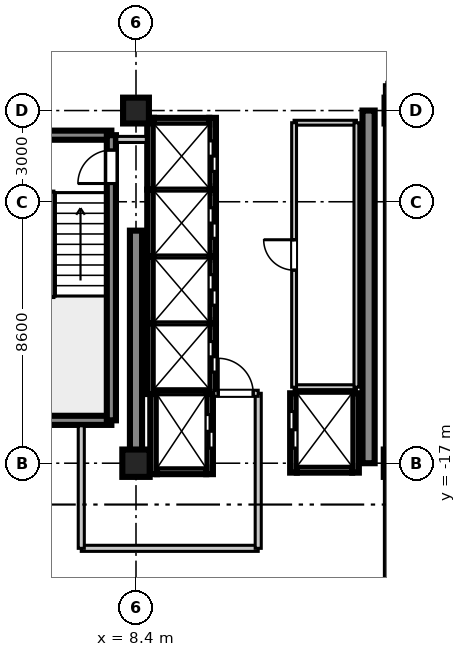
"""IFC4 building model, lengths in metres.
Left out: names, types, materials, properties, quantities, classifications, styles, units other than length and angle.
Written with IfcOpenShell. Run it as: python <this file> out.ifc"""

import sys

from ifc_helpers import new_model, si_unit, direction, frame, frame_2d, origin, origin_2d, place, context, subcontext, project, spatial, rectangle, extrude, source, transform, mapped, element, fill, save


model = new_model("IFC4")
c1 = context("Model", 3, precision=1e-05, world=origin(), true_north=direction((0.0, 1.0)))
c2 = subcontext(c1, "Body", "Model", "MODEL_VIEW")
j1 = project(units=[si_unit("LENGTHUNIT", "METRE"), si_unit("PLANEANGLEUNIT", "RADIAN")], contexts=[c1])
p1 = place(None, origin())
s1 = spatial("IfcSite", under=j1, at=p1, CompositionType="ELEMENT")
p2 = place(p1, origin())
s2 = spatial("IfcBuilding", under=s1, at=p2, CompositionType="ELEMENT")
p3 = place(p2, frame((0.0, 0.0, 319.55)))
s3 = spatial("IfcBuildingStorey", under=s2, at=p3, CompositionType="ELEMENT", Elevation=319.55)
m1 = source(origin(), c2, "Body", "SweptSolid", [
    extrude(rectangle(XDim=0.9, YDim=0.9, at=origin_2d()), origin(), (0.0, 0.0, 1.0), 3.755),
])
p4 = place(p3, frame((8.4, -17.0, 0.0), z_axis=(0.0, 0.0, 1.0), x_axis=(1.0, 0.0, 0.0)))
e1 = element("IfcColumn", 1, at=p4, inside=s3, PredefinedType="COLUMN", context=c2, shape_type="MappedRepresentation", body=[
    mapped(m1, transform((0.0, 0.0, 0.0), scale=1.0)),
])
m2 = source(origin(), c2, "Body", "SweptSolid", [
    extrude(rectangle(XDim=0.85, YDim=0.85, at=origin_2d()), origin(), (0.0, 0.0, 1.0), 3.755),
])
p5 = place(p3, frame((8.4, -5.4, 0.0), z_axis=(0.0, 0.0, 1.0), x_axis=(1.0, 0.0, 0.0)))
e2 = element("IfcColumn", 2, at=p5, inside=s3, PredefinedType="PILASTER", context=c2, shape_type="MappedRepresentation", body=[
    mapped(m2, transform((0.0, 0.0, 0.0), scale=1.0)),
])
p6 = place(p3, frame((17.0, -17.0, 0.0), z_axis=(0.0, 0.0, 1.0), x_axis=(1.0, 0.0, 0.0)))
e3 = element("IfcColumn", 3, at=p6, inside=s3, PredefinedType="COLUMN", context=c2, shape_type="MappedRepresentation", body=[
    mapped(m1, transform((0.0, 0.0, 0.0), scale=1.0)),
])
p7 = place(p3, frame((17.0, -5.4, 0.0), z_axis=(0.0, 0.0, 1.0), x_axis=(1.0, 0.0, 0.0)))
e4 = element("IfcColumn", 4, at=p7, inside=s3, PredefinedType="PILASTER", context=c2, shape_type="MappedRepresentation", body=[
    mapped(m2, transform((0.0, 0.0, 0.0), scale=1.0)),
])
m3 = source(origin(), c2, "Body", "SweptSolid", [
    extrude(rectangle(XDim=7.65, YDim=0.4, at=frame_2d((3.825, 0.0))), origin(), (0.0, 0.0, 1.0), 3.5),
])
p8 = place(p3, frame((8.4, -17.0, 0.0), z_axis=(0.0, 0.0, 1.0), x_axis=(0.0, 1.0, 0.0)))
e5 = element("IfcWall", 5, at=p8, inside=s3, PredefinedType="SHEAR", context=c2, shape_type="MappedRepresentation", body=[
    mapped(m3, transform((0.0, 0.0, 0.0), scale=1.0)),
])
m4 = source(origin(), c2, "Body", "SweptSolid", [
    extrude(rectangle(XDim=11.6, YDim=0.4, at=frame_2d((5.8, 0.0))), origin(), (0.0, 0.0, 1.0), 3.5),
])
p9 = place(p3, frame((16.05, -17.0, 0.0), z_axis=(0.0, 0.0, 1.0), x_axis=(0.0, 1.0, 0.0)))
e6 = element("IfcWall", 6, at=p9, inside=s3, PredefinedType="SHEAR", context=c2, shape_type="MappedRepresentation", body=[
    mapped(m4, transform((0.0, 0.0, 0.0), scale=1.0)),
])
m5 = source(origin(), c2, "Body", "SweptSolid", [
    extrude(rectangle(XDim=3.98, YDim=0.3, at=frame_2d((1.99, 0.0))), origin(), (0.0, 0.0, 1.0), 3.5),
])
for number, where, z_axis, x_axis in (
    (7, (3.61, -15.59, 0.0), (0.0, 0.0, 1.0), (1.0, 0.0, 0.0)),
    (8, (3.61, -6.21, 0.0), (0.0, 0.0, 1.0), (1.0, 0.0, 0.0)),
):
    element("IfcWall", number, at=place(p3, frame(where, z_axis=z_axis, x_axis=x_axis)), inside=s3, PredefinedType="SHEAR", context=c2, shape_type="MappedRepresentation", body=[
        mapped(m5, transform((0.0, 0.0, 0.0), scale=1.0)),
    ])
m6 = source(origin(), c2, "Body", "SweptSolid", [
    extrude(rectangle(XDim=9.38, YDim=0.3, at=frame_2d((4.69, 0.0))), origin(), (0.0, 0.0, 1.0), 3.5),
])
p10 = place(p3, frame((7.59, -15.59, 0.0), z_axis=(0.0, 0.0, 1.0), x_axis=(0.0, 1.0, 0.0)))
e9 = element("IfcWall", 9, at=p10, inside=s3, PredefinedType="SHEAR", context=c2, shape_type="MappedRepresentation", body=[
    mapped(m6, transform((0.0, 0.0, 0.0), scale=1.0)),
])
p11 = place(p10, frame((7.79, 0.0, 0.0)))
e10 = element("IfcOpeningElement", 10, at=p11, cuts=e9, PredefinedType="OPENING", context=c2, shape_type="SweptSolid", body=[
    extrude(rectangle(XDim=1.1, YDim=2.15, at=frame_2d((0.55, 1.075))), frame((0.0, 0.16, 0.0), z_axis=(0.0, -1.0, 0.0), x_axis=(1.0, 0.0, 0.0)), (0.0, 0.0, 1.0), 0.32),
])
m7 = source(origin(), c2, "Body", "SweptSolid", [
    extrude(rectangle(XDim=2.36, YDim=0.22, at=frame_2d((1.18, 0.0))), origin(), (0.0, 0.0, 1.0), 3.5),
])
p12 = place(p3, frame((8.88, -8.0, 0.0), z_axis=(0.0, 0.0, 1.0), x_axis=(0.0, 1.0, 0.0)))
e11 = element("IfcWall", 11, at=p12, inside=s3, PredefinedType="SHEAR", context=c2, shape_type="MappedRepresentation", body=[
    mapped(m7, transform((0.0, 0.0, 0.0), scale=1.0)),
])
p13 = place(p3, frame((10.92, -8.0, 0.0), z_axis=(0.0, 0.0, 1.0), x_axis=(0.0, 1.0, 0.0)))
e12 = element("IfcWall", 12, at=p13, inside=s3, PredefinedType="SHEAR", context=c2, shape_type="MappedRepresentation", body=[
    mapped(m7, transform((0.0, 0.0, 0.0), scale=1.0)),
])
p14 = place(p13, frame((0.6, 0.0, 0.0)))
e13 = element("IfcOpeningElement", 13, at=p14, cuts=e12, PredefinedType="OPENING", context=c2, shape_type="SweptSolid", body=[
    extrude(rectangle(XDim=1.0, YDim=2.2, at=frame_2d((0.5, 1.1))), frame((0.0, 0.12, 0.0), z_axis=(0.0, -1.0, 0.0), x_axis=(1.0, 0.0, 0.0)), (0.0, 0.0, 1.0), 0.24),
])
m8 = source(origin(), c2, "Body", "SweptSolid", [
    extrude(rectangle(XDim=1.82, YDim=0.22, at=frame_2d((0.91, 0.0))), origin(), (0.0, 0.0, 1.0), 3.5),
])
p15 = place(p3, frame((8.99, -5.75, 0.0), z_axis=(0.0, 0.0, 1.0), x_axis=(1.0, 0.0, 0.0)))
e14 = element("IfcWall", 14, at=p15, inside=s3, PredefinedType="SHEAR", context=c2, shape_type="MappedRepresentation", body=[
    mapped(m8, transform((0.0, 0.0, 0.0), scale=1.0)),
])
m9 = source(origin(), c2, "Body", "SweptSolid", [
    extrude(rectangle(XDim=2.2, YDim=0.22, at=frame_2d((1.1, 0.0))), origin(), (0.0, 0.0, 1.0), 3.5),
])
p16 = place(p3, frame((8.88, -10.2, 0.0), z_axis=(0.0, 0.0, 1.0), x_axis=(0.0, 1.0, 0.0)))
e15 = element("IfcWall", 15, at=p16, inside=s3, PredefinedType="SHEAR", context=c2, shape_type="MappedRepresentation", body=[
    mapped(m9, transform((0.0, 0.0, 0.0), scale=1.0)),
])
p17 = place(p3, frame((10.92, -10.2, 0.0), z_axis=(0.0, 0.0, 1.0), x_axis=(0.0, 1.0, 0.0)))
e16 = element("IfcWall", 16, at=p17, inside=s3, PredefinedType="SHEAR", context=c2, shape_type="MappedRepresentation", body=[
    mapped(m9, transform((0.0, 0.0, 0.0), scale=1.0)),
])
p18 = place(p17, frame((0.6, 0.0, 0.0)))
e17 = element("IfcOpeningElement", 17, at=p18, cuts=e16, PredefinedType="OPENING", context=c2, shape_type="SweptSolid", body=[
    extrude(rectangle(XDim=1.0, YDim=2.2, at=frame_2d((0.5, 1.1))), frame((0.0, 0.12, 0.0), z_axis=(0.0, -1.0, 0.0), x_axis=(1.0, 0.0, 0.0)), (0.0, 0.0, 1.0), 0.24),
])
m10 = source(origin(), c2, "Body", "SweptSolid", [
    extrude(rectangle(XDim=1.82, YDim=0.22, at=frame_2d((0.91, 0.0))), origin(), (0.0, 0.0, 1.0), 3.8),
])
p19 = place(p3, frame((8.99, -8.0, 0.0), z_axis=(0.0, 0.0, 1.0), x_axis=(1.0, 0.0, 0.0)))
e18 = element("IfcWall", 18, at=p19, inside=s3, PredefinedType="SHEAR", context=c2, shape_type="MappedRepresentation", body=[
    mapped(m10, transform((0.0, 0.0, 0.0), scale=1.0)),
])
p20 = place(p3, frame((8.88, -12.4, 0.0), z_axis=(0.0, 0.0, 1.0), x_axis=(0.0, 1.0, 0.0)))
e19 = element("IfcWall", 19, at=p20, inside=s3, PredefinedType="SHEAR", context=c2, shape_type="MappedRepresentation", body=[
    mapped(m9, transform((0.0, 0.0, 0.0), scale=1.0)),
])
p21 = place(p3, frame((10.92, -12.4, 0.0), z_axis=(0.0, 0.0, 1.0), x_axis=(0.0, 1.0, 0.0)))
e20 = element("IfcWall", 20, at=p21, inside=s3, PredefinedType="SHEAR", context=c2, shape_type="MappedRepresentation", body=[
    mapped(m9, transform((0.0, 0.0, 0.0), scale=1.0)),
])
p22 = place(p21, frame((0.6, 0.0, 0.0)))
e21 = element("IfcOpeningElement", 21, at=p22, cuts=e20, PredefinedType="OPENING", context=c2, shape_type="SweptSolid", body=[
    extrude(rectangle(XDim=1.0, YDim=2.2, at=frame_2d((0.5, 1.1))), frame((0.0, 0.12, 0.0), z_axis=(0.0, -1.0, 0.0), x_axis=(1.0, 0.0, 0.0)), (0.0, 0.0, 1.0), 0.24),
])
p23 = place(p3, frame((8.99, -10.2, 0.0), z_axis=(0.0, 0.0, 1.0), x_axis=(1.0, 0.0, 0.0)))
e22 = element("IfcWall", 22, at=p23, inside=s3, PredefinedType="SHEAR", context=c2, shape_type="MappedRepresentation", body=[
    mapped(m10, transform((0.0, 0.0, 0.0), scale=1.0)),
])
m11 = source(origin(), c2, "Body", "SweptSolid", [
    extrude(rectangle(XDim=2.325, YDim=0.22, at=frame_2d((1.163, 0.0))), origin(), (0.0, 0.0, 1.0), 3.5),
])
p24 = place(p3, frame((8.88, -14.725, 0.0), z_axis=(0.0, 0.0, 1.0), x_axis=(0.0, 1.0, 0.0)))
e23 = element("IfcWall", 23, at=p24, inside=s3, PredefinedType="SHEAR", context=c2, shape_type="MappedRepresentation", body=[
    mapped(m11, transform((0.0, 0.0, 0.0), scale=1.0)),
])
p25 = place(p3, frame((10.92, -14.725, 0.0), z_axis=(0.0, 0.0, 1.0), x_axis=(0.0, 1.0, 0.0)))
e24 = element("IfcWall", 24, at=p25, inside=s3, PredefinedType="SHEAR", context=c2, shape_type="MappedRepresentation", body=[
    mapped(m11, transform((0.0, 0.0, 0.0), scale=1.0)),
])
p26 = place(p25, frame((0.725, 0.0, 0.0)))
e25 = element("IfcOpeningElement", 25, at=p26, cuts=e24, PredefinedType="OPENING", context=c2, shape_type="SweptSolid", body=[
    extrude(rectangle(XDim=1.0, YDim=2.2, at=frame_2d((0.5, 1.1))), frame((0.0, 0.12, 0.0), z_axis=(0.0, -1.0, 0.0), x_axis=(1.0, 0.0, 0.0)), (0.0, 0.0, 1.0), 0.24),
])
p27 = place(p3, frame((8.99, -12.4, 0.0), z_axis=(0.0, 0.0, 1.0), x_axis=(1.0, 0.0, 0.0)))
e26 = element("IfcWall", 26, at=p27, inside=s3, PredefinedType="SHEAR", context=c2, shape_type="MappedRepresentation", body=[
    mapped(m10, transform((0.0, 0.0, 0.0), scale=1.0)),
])
m12 = source(origin(), c2, "Body", "SweptSolid", [
    extrude(rectangle(XDim=2.635, YDim=0.22, at=frame_2d((1.317, 0.0))), origin(), (0.0, 0.0, 1.0), 3.5),
])
p28 = place(p3, frame((8.98, -17.36, 0.0), z_axis=(0.0, 0.0, 1.0), x_axis=(0.0, 1.0, 0.0)))
e27 = element("IfcWall", 27, at=p28, inside=s3, PredefinedType="SHEAR", context=c2, shape_type="MappedRepresentation", body=[
    mapped(m12, transform((0.0, 0.0, 0.0), scale=1.0)),
])
p29 = place(p3, frame((10.82, -17.36, 0.0), z_axis=(0.0, 0.0, 1.0), x_axis=(0.0, 1.0, 0.0)))
e28 = element("IfcWall", 28, at=p29, inside=s3, PredefinedType="SHEAR", context=c2, shape_type="MappedRepresentation", body=[
    mapped(m12, transform((0.0, 0.0, 0.0), scale=1.0)),
])
p30 = place(p29, frame((0.86, 0.0, 0.0)))
e29 = element("IfcOpeningElement", 29, at=p30, cuts=e28, PredefinedType="OPENING", context=c2, shape_type="SweptSolid", body=[
    extrude(rectangle(XDim=1.1, YDim=2.2, at=frame_2d((0.55, 1.1))), frame((0.0, 0.12, 0.0), z_axis=(0.0, -1.0, 0.0), x_axis=(1.0, 0.0, 0.0)), (0.0, 0.0, 1.0), 0.24),
])
m13 = source(origin(), c2, "Body", "SweptSolid", [
    extrude(rectangle(XDim=1.62, YDim=0.22, at=frame_2d((0.81, 0.0))), origin(), (0.0, 0.0, 1.0), 3.5),
])
p31 = place(p3, frame((9.09, -17.25, 0.0), z_axis=(0.0, 0.0, 1.0), x_axis=(1.0, 0.0, 0.0)))
e30 = element("IfcWall", 30, at=p31, inside=s3, PredefinedType="SHEAR", context=c2, shape_type="MappedRepresentation", body=[
    mapped(m13, transform((0.0, 0.0, 0.0), scale=1.0)),
])
m14 = source(origin(), c2, "Body", "SweptSolid", [
    extrude(rectangle(XDim=1.62, YDim=0.22, at=frame_2d((0.81, 0.0))), origin(), (0.0, 0.0, 1.0), 3.8),
])
p32 = place(p3, frame((9.09, -14.725, 0.0), z_axis=(0.0, 0.0, 1.0), x_axis=(1.0, 0.0, 0.0)))
e31 = element("IfcWall", 31, at=p32, inside=s3, PredefinedType="SHEAR", context=c2, shape_type="MappedRepresentation", body=[
    mapped(m14, transform((0.0, 0.0, 0.0), scale=1.0)),
])
m15 = source(origin(), c2, "Body", "SweptSolid", [
    extrude(rectangle(XDim=2.61, YDim=0.22, at=frame_2d((1.305, 0.0))), origin(), (0.0, 0.0, 1.0), 3.5),
])
p33 = place(p3, frame((13.58, -17.31, 0.0), z_axis=(0.0, 0.0, 1.0), x_axis=(0.0, 1.0, 0.0)))
e32 = element("IfcWall", 32, at=p33, inside=s3, PredefinedType="SHEAR", context=c2, shape_type="MappedRepresentation", body=[
    mapped(m15, transform((0.0, 0.0, 0.0), scale=1.0)),
])
p34 = place(p33, frame((0.81, 0.0, 0.0)))
e33 = element("IfcOpeningElement", 33, at=p34, cuts=e32, PredefinedType="OPENING", context=c2, shape_type="SweptSolid", body=[
    extrude(rectangle(XDim=1.2, YDim=2.2, at=frame_2d((0.6, 1.1))), frame((0.0, 0.12, 0.0), z_axis=(0.0, -1.0, 0.0), x_axis=(1.0, 0.0, 0.0)), (0.0, 0.0, 1.0), 0.24),
])
p35 = place(p3, frame((15.62, -17.31, 0.0), z_axis=(0.0, 0.0, 1.0), x_axis=(0.0, 1.0, 0.0)))
e34 = element("IfcWall", 34, at=p35, inside=s3, PredefinedType="SHEAR", context=c2, shape_type="MappedRepresentation", body=[
    mapped(m15, transform((0.0, 0.0, 0.0), scale=1.0)),
])
p36 = place(p3, frame((13.69, -17.2, 0.0), z_axis=(0.0, 0.0, 1.0), x_axis=(1.0, 0.0, 0.0)))
e35 = element("IfcWall", 35, at=p36, inside=s3, PredefinedType="SHEAR", context=c2, shape_type="MappedRepresentation", body=[
    mapped(m8, transform((0.0, 0.0, 0.0), scale=1.0)),
])
p37 = place(p3, frame((13.69, -14.7, 0.0), z_axis=(0.0, 0.0, 1.0), x_axis=(1.0, 0.0, 0.0)))
e36 = element("IfcWall", 36, at=p37, inside=s3, PredefinedType="SHEAR", context=c2, shape_type="MappedRepresentation", body=[
    mapped(m10, transform((0.0, 0.0, 0.0), scale=1.0)),
])
m16 = source(origin(), c2, "Body", "SweptSolid", [
    extrude(rectangle(XDim=5.82, YDim=0.2, at=frame_2d((2.91, 0.0))), origin(), (0.0, 0.0, 1.0), 2.84),
])
p38 = place(p3, frame((6.6, -19.8, 0.0), z_axis=(0.0, 0.0, 1.0), x_axis=(1.0, 0.0, 0.0)))
e37 = element("IfcWall", 37, at=p38, inside=s3, PredefinedType="PARTITIONING", context=c2, shape_type="MappedRepresentation", body=[
    mapped(m16, transform((0.0, 0.0, 0.0), scale=1.0)),
])
m17 = source(origin(), c2, "Body", "SweptSolid", [
    extrude(rectangle(XDim=4.03, YDim=0.2, at=frame_2d((2.015, 0.0))), origin(), (0.0, 0.0, 1.0), 2.84),
])
p39 = place(p3, frame((6.6, -19.8, 0.0), z_axis=(0.0, 0.0, 1.0), x_axis=(0.0, 1.0, 0.0)))
e38 = element("IfcWall", 38, at=p39, inside=s3, PredefinedType="PARTITIONING", context=c2, shape_type="MappedRepresentation", body=[
    mapped(m17, transform((0.0, 0.0, 0.0), scale=1.0)),
])
m18 = source(origin(), c2, "Body", "SweptSolid", [
    extrude(rectangle(XDim=5.1, YDim=0.2, at=frame_2d((2.55, 0.0))), origin(), (0.0, 0.0, 1.0), 2.84),
])
p40 = place(p3, frame((12.42, -19.8, 0.0), z_axis=(0.0, 0.0, 1.0), x_axis=(0.0, 1.0, 0.0)))
e39 = element("IfcWall", 39, at=p40, inside=s3, PredefinedType="PARTITIONING", context=c2, shape_type="MappedRepresentation", body=[
    mapped(m18, transform((0.0, 0.0, 0.0), scale=1.0)),
])
m19 = source(origin(), c2, "Body", "SweptSolid", [
    extrude(rectangle(XDim=1.46, YDim=0.2, at=frame_2d((0.73, 0.0))), origin(), (0.0, 0.0, 1.0), 2.84),
])
p41 = place(p3, frame((10.96, -14.7, 0.0), z_axis=(0.0, 0.0, 1.0), x_axis=(1.0, 0.0, 0.0)))
e40 = element("IfcWall", 40, at=p41, inside=s3, PredefinedType="PARTITIONING", context=c2, shape_type="MappedRepresentation", body=[
    mapped(m19, transform((0.0, 0.0, 0.0), scale=1.0)),
])
p42 = place(p41, frame((0.145, 0.0, 0.0)))
e41 = element("IfcOpeningElement", 41, at=p42, cuts=e40, PredefinedType="OPENING", context=c2, shape_type="SweptSolid", body=[
    extrude(rectangle(XDim=1.15, YDim=2.15, at=frame_2d((0.575, 1.075))), frame((0.0, 0.11, 0.0), z_axis=(0.0, -1.0, 0.0), x_axis=(1.0, 0.0, 0.0)), (0.0, 0.0, 1.0), 0.22),
])
m20 = source(origin(), c2, "Body", "SweptSolid", [
    extrude(rectangle(XDim=0.97, YDim=0.2, at=frame_2d((0.485, 0.0))), origin(), (0.0, 0.0, 1.0), 2.84),
])
p43 = place(p3, frame((7.77, -6.35, 0.0), z_axis=(0.0, 0.0, 1.0), x_axis=(1.0, 0.0, 0.0)))
e42 = element("IfcWall", 42, at=p43, inside=s3, PredefinedType="PARTITIONING", context=c2, shape_type="MappedRepresentation", body=[
    mapped(m20, transform((0.0, 0.0, 0.0), scale=1.0)),
])
m21 = source(origin(), c2, "Body", "SweptSolid", [
    extrude(rectangle(XDim=2.05, YDim=0.16, at=frame_2d((1.025, 0.0))), origin(), (0.0, 0.0, 1.0), 2.84),
])
for number, where, z_axis, x_axis in (
    (43, (13.6, -14.5, 0.0), (0.0, 0.0, 1.0), (1.0, 0.0, 0.0)),
    (44, (13.6, -5.8, 0.0), (0.0, 0.0, 1.0), (1.0, 0.0, 0.0)),
):
    element("IfcWall", number, at=place(p3, frame(where, z_axis=z_axis, x_axis=x_axis)), inside=s3, PredefinedType="PARTITIONING", context=c2, shape_type="MappedRepresentation", body=[
        mapped(m21, transform((0.0, 0.0, 0.0), scale=1.0)),
    ])
m22 = source(origin(), c2, "Body", "SweptSolid", [
    extrude(rectangle(XDim=8.7, YDim=0.16, at=frame_2d((4.35, 0.0))), origin(), (0.0, 0.0, 1.0), 2.84),
])
p44 = place(p3, frame((13.6, -14.5, 0.0), z_axis=(0.0, 0.0, 1.0), x_axis=(0.0, 1.0, 0.0)))
e45 = element("IfcWall", 45, at=p44, inside=s3, PredefinedType="PARTITIONING", context=c2, shape_type="MappedRepresentation", body=[
    mapped(m22, transform((0.0, 0.0, 0.0), scale=1.0)),
])
p45 = place(p44, frame((3.85, 0.0, 0.0)))
e46 = element("IfcOpeningElement", 46, at=p45, cuts=e45, PredefinedType="OPENING", context=c2, shape_type="SweptSolid", body=[
    extrude(rectangle(XDim=1.0, YDim=2.1, at=frame_2d((0.5, 1.05))), frame((0.0, 0.09, 0.0), z_axis=(0.0, -1.0, 0.0), x_axis=(1.0, 0.0, 0.0)), (0.0, 0.0, 1.0), 0.18),
])
p46 = place(p3, frame((15.65, -14.5, 0.0), z_axis=(0.0, 0.0, 1.0), x_axis=(0.0, 1.0, 0.0)))
e47 = element("IfcWall", 47, at=p46, inside=s3, PredefinedType="PARTITIONING", context=c2, shape_type="MappedRepresentation", body=[
    mapped(m22, transform((0.0, 0.0, 0.0), scale=1.0)),
])
m23 = source(origin(), c2, "Body", "SweptSolid", [
    extrude(rectangle(XDim=17.95, YDim=0.16, at=frame_2d((8.975, 0.0))), origin(), (0.0, 0.0, 1.0), 2.84),
])
p47 = place(p3, frame((16.65, -22.5, 0.0), z_axis=(0.0, 0.0, 1.0), x_axis=(0.0, 1.0, 0.0)))
e48 = element("IfcWall", 48, at=p47, inside=s3, PredefinedType="PARTITIONING", context=c2, shape_type="MappedRepresentation", body=[
    mapped(m23, transform((0.0, 0.0, 0.0), scale=1.0)),
])
m24 = source(origin(), c2, "Body", "SweptSolid", [
    extrude(rectangle(XDim=1.1, YDim=2.15, at=frame_2d((0.55, 1.075))), frame((0.0, 0.025, 0.0), z_axis=(0.0, -1.0, 0.0), x_axis=(1.0, 0.0, 0.0)), (0.0, 0.0, 1.0), 0.05),
])
p48 = place(p11, origin())
e49 = element("IfcDoor", 49, at=p48, inside=s3, OperationType="SINGLE_SWING_LEFT", PredefinedType="DOOR", context=c2, shape_type="MappedRepresentation", body=[
    mapped(m24, transform((0.0, 0.0, 0.0), scale=1.0)),
])
fill(e10, e49)
m25 = source(origin(), c2, "Body", "SweptSolid", [
    extrude(rectangle(XDim=1.0, YDim=2.2, at=frame_2d((0.5, 1.1))), frame((0.0, 0.025, 0.0), z_axis=(0.0, -1.0, 0.0), x_axis=(1.0, 0.0, 0.0)), (0.0, 0.0, 1.0), 0.05),
])
p49 = place(p14, frame((1.0, 0.0, 0.0), z_axis=(0.0, 0.0, 1.0), x_axis=(-1.0, 0.0, 0.0)))
e50 = element("IfcDoor", 50, at=p49, inside=s3, OperationType="DOUBLE_DOOR_SLIDING", PredefinedType="DOOR", context=c2, shape_type="MappedRepresentation", body=[
    mapped(m25, transform((0.0, 0.0, 0.0), scale=1.0)),
])
fill(e13, e50)
p50 = place(p18, frame((1.0, 0.0, 0.0), z_axis=(0.0, 0.0, 1.0), x_axis=(-1.0, 0.0, 0.0)))
e51 = element("IfcDoor", 51, at=p50, inside=s3, OperationType="DOUBLE_DOOR_SLIDING", PredefinedType="DOOR", context=c2, shape_type="MappedRepresentation", body=[
    mapped(m25, transform((0.0, 0.0, 0.0), scale=1.0)),
])
fill(e17, e51)
p51 = place(p22, frame((1.0, 0.0, 0.0), z_axis=(0.0, 0.0, 1.0), x_axis=(-1.0, 0.0, 0.0)))
e52 = element("IfcDoor", 52, at=p51, inside=s3, OperationType="DOUBLE_DOOR_SLIDING", PredefinedType="DOOR", context=c2, shape_type="MappedRepresentation", body=[
    mapped(m25, transform((0.0, 0.0, 0.0), scale=1.0)),
])
fill(e21, e52)
p52 = place(p26, frame((1.0, 0.0, 0.0), z_axis=(0.0, 0.0, 1.0), x_axis=(-1.0, 0.0, 0.0)))
e53 = element("IfcDoor", 53, at=p52, inside=s3, OperationType="DOUBLE_DOOR_SLIDING", PredefinedType="DOOR", context=c2, shape_type="MappedRepresentation", body=[
    mapped(m25, transform((0.0, 0.0, 0.0), scale=1.0)),
])
fill(e25, e53)
m26 = source(origin(), c2, "Body", "SweptSolid", [
    extrude(rectangle(XDim=1.1, YDim=2.2, at=frame_2d((0.55, 1.1))), frame((0.0, 0.025, 0.0), z_axis=(0.0, -1.0, 0.0), x_axis=(1.0, 0.0, 0.0)), (0.0, 0.0, 1.0), 0.05),
])
p53 = place(p30, frame((1.1, 0.0, 0.0), z_axis=(0.0, 0.0, 1.0), x_axis=(-1.0, 0.0, 0.0)))
e54 = element("IfcDoor", 54, at=p53, inside=s3, OperationType="DOUBLE_DOOR_SLIDING", PredefinedType="DOOR", context=c2, shape_type="MappedRepresentation", body=[
    mapped(m26, transform((0.0, 0.0, 0.0), scale=1.0)),
])
fill(e29, e54)
m27 = source(origin(), c2, "Body", "SweptSolid", [
    extrude(rectangle(XDim=1.2, YDim=2.2, at=frame_2d((0.6, 1.1))), frame((0.0, 0.025, 0.0), z_axis=(0.0, -1.0, 0.0), x_axis=(1.0, 0.0, 0.0)), (0.0, 0.0, 1.0), 0.05),
])
p54 = place(p34, origin())
e55 = element("IfcDoor", 55, at=p54, inside=s3, OperationType="DOUBLE_DOOR_SLIDING", PredefinedType="DOOR", context=c2, shape_type="MappedRepresentation", body=[
    mapped(m27, transform((0.0, 0.0, 0.0), scale=1.0)),
])
fill(e33, e55)
m28 = source(origin(), c2, "Body", "SweptSolid", [
    extrude(rectangle(XDim=1.15, YDim=2.15, at=frame_2d((0.575, 1.075))), frame((0.0, 0.025, 0.0), z_axis=(0.0, -1.0, 0.0), x_axis=(1.0, 0.0, 0.0)), (0.0, 0.0, 1.0), 0.05),
])
p55 = place(p42, origin())
e56 = element("IfcDoor", 56, at=p55, inside=s3, OperationType="SINGLE_SWING_LEFT", PredefinedType="DOOR", context=c2, shape_type="MappedRepresentation", body=[
    mapped(m28, transform((0.0, 0.0, 0.0), scale=1.0)),
])
fill(e41, e56)
m29 = source(origin(), c2, "Body", "SweptSolid", [
    extrude(rectangle(XDim=1.0, YDim=2.1, at=frame_2d((0.5, 1.05))), frame((0.0, 0.025, 0.0), z_axis=(0.0, -1.0, 0.0), x_axis=(1.0, 0.0, 0.0)), (0.0, 0.0, 1.0), 0.05),
])
p56 = place(p45, frame((1.0, 0.0, 0.0), z_axis=(0.0, 0.0, 1.0), x_axis=(-1.0, 0.0, 0.0)))
e57 = element("IfcDoor", 57, at=p56, inside=s3, OperationType="SINGLE_SWING_RIGHT", PredefinedType="DOOR", context=c2, shape_type="MappedRepresentation", body=[
    mapped(m29, transform((0.0, 0.0, 0.0), scale=1.0)),
])
fill(e46, e57)
save(model, sys.argv[1])
